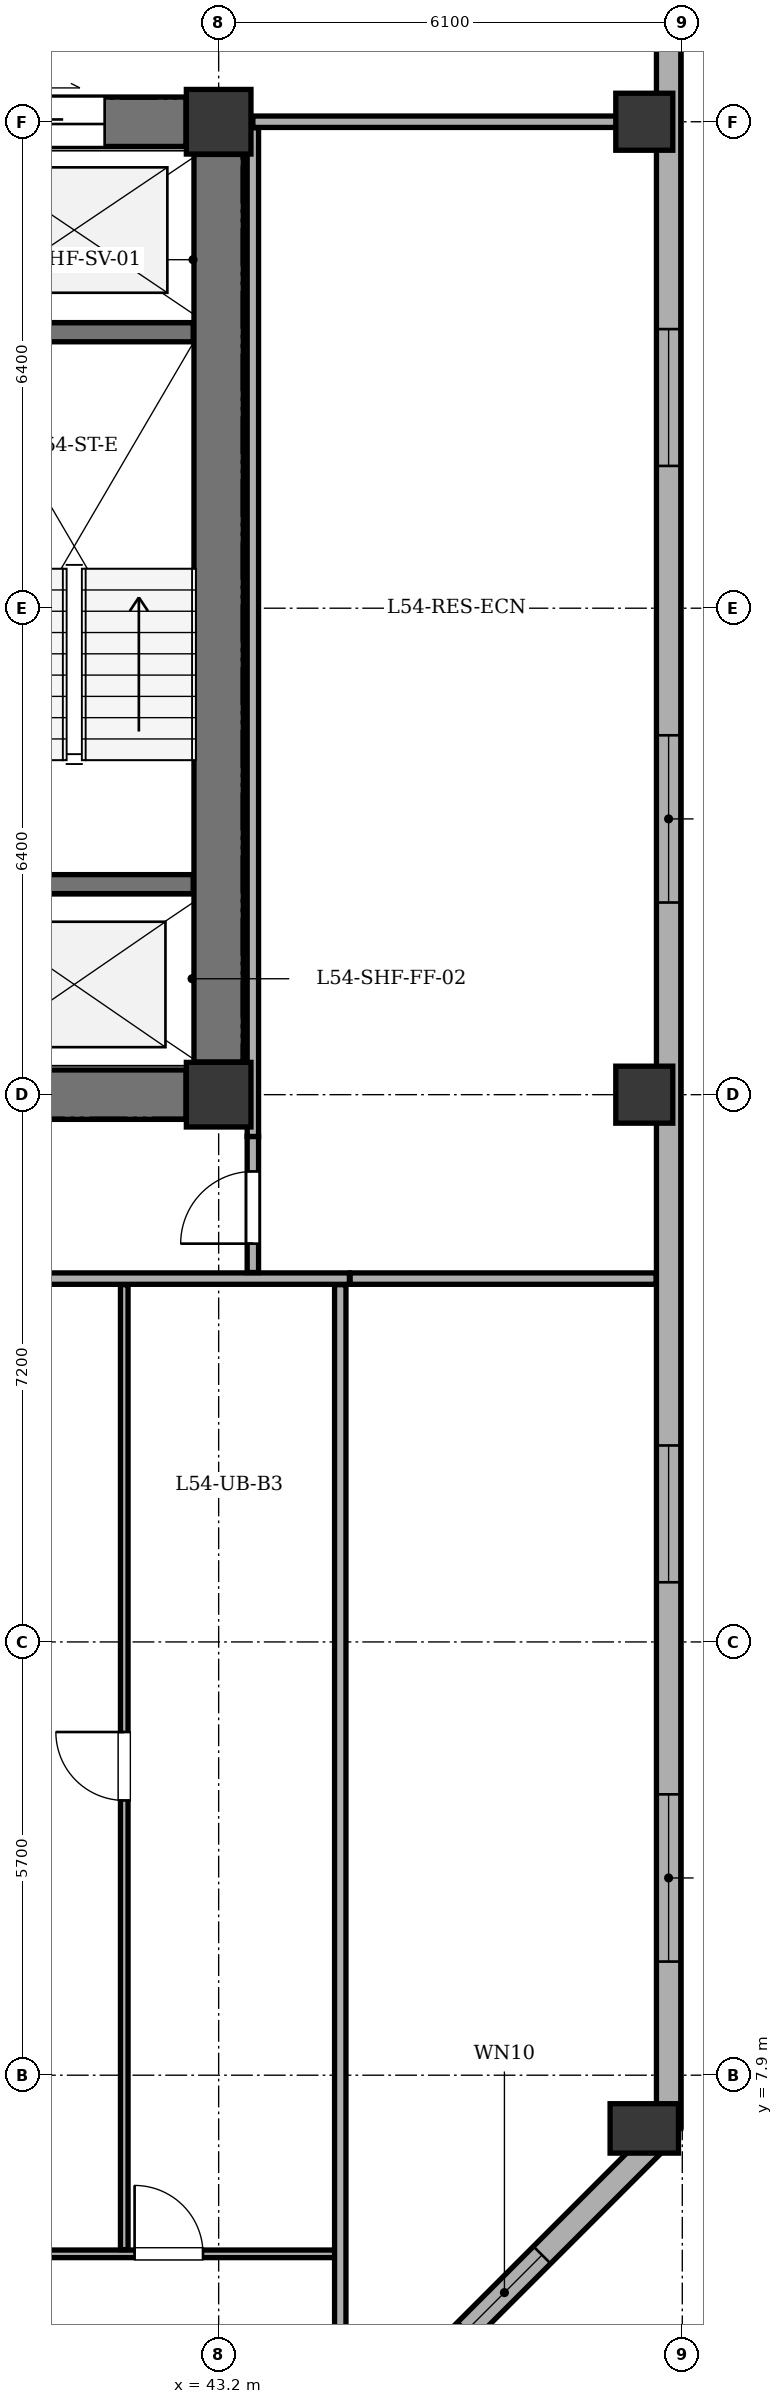
"""IFC4 building model, lengths in metres.
Left out: names, types, materials, properties, quantities, classifications, styles, units other than length and angle.
Written with IfcOpenShell. Run it as: python <this file> out.ifc"""

import sys

from ifc_helpers import new_model, si_unit, direction, frame, frame_2d, origin, origin_2d, place, context, subcontext, project, spatial, rectangle, extrude, element, fill, save


model = new_model("IFC4")
c1 = context("Model", 3, precision=1e-05, world=origin(), true_north=direction((0.0, 1.0)))
c2 = subcontext(c1, "Body", "Model", "MODEL_VIEW")
j1 = project(units=[si_unit("LENGTHUNIT", "METRE"), si_unit("PLANEANGLEUNIT", "RADIAN")], contexts=[c1])
p1 = place(None, origin())
s1 = spatial("IfcSite", under=j1, at=p1, CompositionType="ELEMENT")
p2 = place(p1, origin())
s2 = spatial("IfcBuilding", under=s1, at=p2, CompositionType="ELEMENT")
p3 = place(p2, frame((0.0, 0.0, 210.9)))
s3 = spatial("IfcBuildingStorey", under=s2, at=p3, CompositionType="ELEMENT", Elevation=210.9)
for number, where, z_axis, x_axis in (
    (1, (43.2, 20.8, 0.0), (0.0, 0.0, 1.0), (1.0, 0.0, 0.0)),
    (2, (43.2, 33.6, 0.0), (0.0, 0.0, 1.0), (1.0, 0.0, 0.0)),
):
    element("IfcColumn", number, at=place(p3, frame(where, z_axis=z_axis, x_axis=x_axis)), inside=s3, PredefinedType="COLUMN", context=c2, shape_type="SweptSolid", body=[
        extrude(rectangle(XDim=0.85, YDim=0.85, at=origin_2d()), origin(), (0.0, 0.0, 1.0), 3.4),
    ])
p4 = place(p3, frame((48.8, 7.2, 0.0), z_axis=(0.0, 0.0, 1.0), x_axis=(1.0, 0.0, 0.0)))
e3 = element("IfcColumn", 3, at=p4, inside=s3, PredefinedType="COLUMN", context=c2, shape_type="SweptSolid", body=[
    extrude(rectangle(XDim=0.65, YDim=0.9, at=origin_2d()), origin(), (0.0, 0.0, 1.0), 3.4),
])
for number, where, z_axis, x_axis in (
    (4, (48.8, 20.8, 0.0), (0.0, 0.0, 1.0), (1.0, 0.0, 0.0)),
    (5, (48.8, 33.6, 0.0), (0.0, 0.0, 1.0), (1.0, 0.0, 0.0)),
):
    element("IfcColumn", number, at=place(p3, frame(where, z_axis=z_axis, x_axis=x_axis)), inside=s3, PredefinedType="COLUMN", context=c2, shape_type="SweptSolid", body=[
        extrude(rectangle(XDim=0.75, YDim=0.75, at=origin_2d()), origin(), (0.0, 0.0, 1.0), 3.4),
    ])
p5 = place(p3, frame((49.12, 35.0, 0.0), z_axis=(0.0, 0.0, 1.0), x_axis=(0.0, -1.0, 0.0)))
e6 = element("IfcWall", 6, at=p5, inside=s3, PredefinedType="STANDARD", context=c2, shape_type="SweptSolid", body=[
    extrude(rectangle(XDim=27.8, YDim=0.32, at=frame_2d((13.9, 0.0))), origin(), (0.0, 0.0, 1.0), 2.725),
])
p6 = place(p5, frame((4.128, 0.0, 0.75)))
e7 = element("IfcOpeningElement", 7, at=p6, cuts=e6, PredefinedType="OPENING", context=c2, shape_type="SweptSolid", body=[
    extrude(rectangle(XDim=1.8, YDim=1.7, at=frame_2d((0.9, 0.85))), frame((0.0, 0.17, 0.0), z_axis=(0.0, -1.0, 0.0), x_axis=(1.0, 0.0, 0.0)), (0.0, 0.0, 1.0), 0.34),
])
p7 = place(p5, frame((9.472, 0.0, 0.75)))
e8 = element("IfcOpeningElement", 8, at=p7, cuts=e6, PredefinedType="OPENING", context=c2, shape_type="SweptSolid", body=[
    extrude(rectangle(XDim=2.2, YDim=1.7, at=frame_2d((1.1, 0.85))), frame((0.0, 0.17, 0.0), z_axis=(0.0, -1.0, 0.0), x_axis=(1.0, 0.0, 0.0)), (0.0, 0.0, 1.0), 0.34),
])
p8 = place(p5, frame((18.815, 0.0, 0.75)))
e9 = element("IfcOpeningElement", 9, at=p8, cuts=e6, PredefinedType="OPENING", context=c2, shape_type="SweptSolid", body=[
    extrude(rectangle(XDim=1.8, YDim=1.7, at=frame_2d((0.9, 0.85))), frame((0.0, 0.17, 0.0), z_axis=(0.0, -1.0, 0.0), x_axis=(1.0, 0.0, 0.0)), (0.0, 0.0, 1.0), 0.34),
])
p9 = place(p5, frame((23.405, 0.0, 0.75)))
e10 = element("IfcOpeningElement", 10, at=p9, cuts=e6, PredefinedType="OPENING", context=c2, shape_type="SweptSolid", body=[
    extrude(rectangle(XDim=2.2, YDim=1.7, at=frame_2d((1.1, 0.85))), frame((0.0, 0.17, 0.0), z_axis=(0.0, -1.0, 0.0), x_axis=(1.0, 0.0, 0.0)), (0.0, 0.0, 1.0), 0.34),
])
p10 = place(p3, frame((49.12, 7.2, 0.0), z_axis=(0.0, 0.0, 1.0), x_axis=(-0.707106781187, -0.707106781187, 0.0)))
e11 = element("IfcWall", 11, at=p10, inside=s3, PredefinedType="STANDARD", context=c2, shape_type="SweptSolid", body=[
    extrude(rectangle(XDim=6.11, YDim=0.32, at=frame_2d((3.055, 0.0))), origin(), (0.0, 0.0, 1.0), 2.725),
])
p11 = place(p10, frame((2.355, 0.0, 0.75)))
e12 = element("IfcOpeningElement", 12, at=p11, cuts=e11, PredefinedType="OPENING", context=c2, shape_type="SweptSolid", body=[
    extrude(rectangle(XDim=1.4, YDim=1.65, at=frame_2d((0.7, 0.825))), frame((0.0, 0.17, 0.0), z_axis=(0.0, -1.0, 0.0), x_axis=(1.0, 0.0, 0.0)), (0.0, 0.0, 1.0), 0.34),
])
p12 = place(p3, frame((43.2, 21.23, 0.0), z_axis=(0.0, 0.0, 1.0), x_axis=(0.0, 1.0, 0.0)))
e13 = element("IfcWall", 13, at=p12, inside=s3, PredefinedType="SHEAR", context=c2, shape_type="SweptSolid", body=[
    extrude(rectangle(XDim=11.94, YDim=0.65, at=frame_2d((5.97, 0.0))), origin(), (0.0, 0.0, 1.0), 3.1),
])
p13 = place(p3, frame((35.63, 20.8, 0.0), z_axis=(0.0, 0.0, 1.0), x_axis=(1.0, 0.0, 0.0)))
e14 = element("IfcWall", 14, at=p13, inside=s3, PredefinedType="SHEAR", context=c2, shape_type="SweptSolid", body=[
    extrude(rectangle(XDim=7.14, YDim=0.65, at=frame_2d((3.57, 0.0))), origin(), (0.0, 0.0, 1.0), 3.1),
])
p14 = place(p3, frame((35.63, 33.6, 0.0), z_axis=(0.0, 0.0, 1.0), x_axis=(1.0, 0.0, 0.0)))
e15 = element("IfcWall", 15, at=p14, inside=s3, PredefinedType="SHEAR", context=c2, shape_type="SweptSolid", body=[
    extrude(rectangle(XDim=7.14, YDim=0.65, at=frame_2d((3.57, 0.0))), origin(), (0.0, 0.0, 1.0), 3.1),
])
p15 = place(p14, frame((4.77, 0.0, 0.0)))
e16 = element("IfcOpeningElement", 16, at=p15, cuts=e15, PredefinedType="OPENING", context=c2, shape_type="SweptSolid", body=[
    extrude(rectangle(XDim=1.3, YDim=2.15, at=frame_2d((0.65, 1.075))), frame((0.0, 0.335, 0.0), z_axis=(0.0, -1.0, 0.0), x_axis=(1.0, 0.0, 0.0)), (0.0, 0.0, 1.0), 0.67),
])
p16 = place(p14, frame((2.57, 0.0, 0.0)))
e17 = element("IfcOpeningElement", 17, at=p16, cuts=e15, PredefinedType="OPENING", context=c2, shape_type="SweptSolid", body=[
    extrude(rectangle(XDim=0.85, YDim=2.02, at=frame_2d((0.425, 1.01))), frame((0.0, 0.335, 0.0), z_axis=(0.0, -1.0, 0.0), x_axis=(1.0, 0.0, 0.0)), (0.0, 0.0, 1.0), 0.67),
])
for number, where, z_axis, x_axis in (
    (18, (39.69, 23.57, 0.0), (0.0, 0.0, 1.0), (1.0, 0.0, 0.0)),
    (19, (39.69, 30.83, 0.0), (0.0, 0.0, 1.0), (1.0, 0.0, 0.0)),
):
    element("IfcWall", number, at=place(p3, frame(where, z_axis=z_axis, x_axis=x_axis)), inside=s3, PredefinedType="SHEAR", context=c2, shape_type="SweptSolid", body=[
        extrude(rectangle(XDim=3.175, YDim=0.25, at=frame_2d((1.587, 0.0))), origin(), (0.0, 0.0, 1.0), 3.1),
    ])
p17 = place(p3, frame((10.9, 18.38, 0.0), z_axis=(0.0, 0.0, 1.0), x_axis=(1.0, 0.0, 0.0)))
e20 = element("IfcWall", 20, at=p17, inside=s3, PredefinedType="PARTITIONING", context=c2, shape_type="SweptSolid", body=[
    extrude(rectangle(XDim=34.02, YDim=0.15, at=frame_2d((17.01, 0.0))), origin(), (0.0, 0.0, 1.0), 3.1),
])
p18 = place(p17, frame((7.727, 0.0, 0.0)))
e21 = element("IfcOpeningElement", 21, at=p18, cuts=e20, PredefinedType="OPENING", context=c2, shape_type="SweptSolid", body=[
    extrude(rectangle(XDim=1.0, YDim=2.1, at=frame_2d((0.5, 1.05))), frame((0.0, 0.085, 0.0), z_axis=(0.0, -1.0, 0.0), x_axis=(1.0, 0.0, 0.0)), (0.0, 0.0, 1.0), 0.17),
])
p19 = place(p17, frame((24.617, 0.0, 0.0)))
e22 = element("IfcOpeningElement", 22, at=p19, cuts=e20, PredefinedType="OPENING", context=c2, shape_type="SweptSolid", body=[
    extrude(rectangle(XDim=1.0, YDim=2.1, at=frame_2d((0.5, 1.05))), frame((0.0, 0.085, 0.0), z_axis=(0.0, -1.0, 0.0), x_axis=(1.0, 0.0, 0.0)), (0.0, 0.0, 1.0), 0.17),
])
p20 = place(p3, frame((27.314, 5.55, 0.0), z_axis=(0.0, 0.0, 1.0), x_axis=(1.0, 0.0, 0.0)))
e23 = element("IfcWall", 23, at=p20, inside=s3, PredefinedType="PARTITIONING", context=c2, shape_type="SweptSolid", body=[
    extrude(rectangle(XDim=17.526, YDim=0.1, at=frame_2d((8.763, 0.0))), origin(), (0.0, 0.0, 1.0), 3.1),
])
p21 = place(p20, frame((0.65, 0.0, 0.0)))
e24 = element("IfcOpeningElement", 24, at=p21, cuts=e23, PredefinedType="OPENING", context=c2, shape_type="SweptSolid", body=[
    extrude(rectangle(XDim=0.85, YDim=2.05, at=frame_2d((0.425, 1.025))), frame((0.0, 0.06, 0.0), z_axis=(0.0, -1.0, 0.0), x_axis=(1.0, 0.0, 0.0)), (0.0, 0.0, 1.0), 0.12),
])
p22 = place(p20, frame((5.001, 0.0, 0.0)))
e25 = element("IfcOpeningElement", 25, at=p22, cuts=e23, PredefinedType="OPENING", context=c2, shape_type="SweptSolid", body=[
    extrude(rectangle(XDim=0.85, YDim=2.05, at=frame_2d((0.425, 1.025))), frame((0.0, 0.06, 0.0), z_axis=(0.0, -1.0, 0.0), x_axis=(1.0, 0.0, 0.0)), (0.0, 0.0, 1.0), 0.12),
])
p23 = place(p20, frame((10.428, 0.0, 0.0)))
e26 = element("IfcOpeningElement", 26, at=p23, cuts=e23, PredefinedType="OPENING", context=c2, shape_type="SweptSolid", body=[
    extrude(rectangle(XDim=0.9, YDim=2.05, at=frame_2d((0.45, 1.025))), frame((0.0, 0.06, 0.0), z_axis=(0.0, -1.0, 0.0), x_axis=(1.0, 0.0, 0.0)), (0.0, 0.0, 1.0), 0.12),
])
p24 = place(p20, frame((14.78, 0.0, 0.0)))
e27 = element("IfcOpeningElement", 27, at=p24, cuts=e23, PredefinedType="OPENING", context=c2, shape_type="SweptSolid", body=[
    extrude(rectangle(XDim=0.9, YDim=2.05, at=frame_2d((0.45, 1.025))), frame((0.0, 0.06, 0.0), z_axis=(0.0, -1.0, 0.0), x_axis=(1.0, 0.0, 0.0)), (0.0, 0.0, 1.0), 0.12),
])
p25 = place(p3, frame((41.958, 5.605, 0.0), z_axis=(0.0, 0.0, 1.0), x_axis=(0.0, 1.0, 0.0)))
e28 = element("IfcWall", 28, at=p25, inside=s3, PredefinedType="PARTITIONING", context=c2, shape_type="SweptSolid", body=[
    extrude(rectangle(XDim=12.695, YDim=0.1, at=frame_2d((6.348, 0.0))), origin(), (0.0, 0.0, 1.0), 2.725),
])
p26 = place(p25, frame((5.91, 0.0, 0.0)))
e29 = element("IfcOpeningElement", 29, at=p26, cuts=e28, PredefinedType="OPENING", context=c2, shape_type="SweptSolid", body=[
    extrude(rectangle(XDim=0.9, YDim=2.05, at=frame_2d((0.45, 1.025))), frame((0.0, 0.06, 0.0), z_axis=(0.0, -1.0, 0.0), x_axis=(1.0, 0.0, 0.0)), (0.0, 0.0, 1.0), 0.12),
])
p27 = place(p3, frame((44.8, 3.045, 0.0), z_axis=(0.0, 0.0, 1.0), x_axis=(0.0, 1.0, 0.0)))
e30 = element("IfcWall", 30, at=p27, inside=s3, PredefinedType="PARTITIONING", context=c2, shape_type="SweptSolid", body=[
    extrude(rectangle(XDim=15.255, YDim=0.15, at=frame_2d((7.627, 0.0))), origin(), (0.0, 0.0, 1.0), 3.1),
])
p28 = place(p3, frame((44.93, 18.38, 0.0), z_axis=(0.0, 0.0, 1.0), x_axis=(1.0, 0.0, 0.0)))
e31 = element("IfcWall", 31, at=p28, inside=s3, PredefinedType="PARTITIONING", context=c2, shape_type="SweptSolid", body=[
    extrude(rectangle(XDim=4.025, YDim=0.15, at=frame_2d((2.013, 0.0))), origin(), (0.0, 0.0, 1.0), 3.1),
])
p29 = place(p3, frame((43.65, 33.6, 0.0), z_axis=(0.0, 0.0, 1.0), x_axis=(1.0, 0.0, 0.0)))
e32 = element("IfcWall", 32, at=p29, inside=s3, PredefinedType="PARTITIONING", context=c2, shape_type="SweptSolid", body=[
    extrude(rectangle(XDim=5.305, YDim=0.15, at=frame_2d((2.653, 0.0))), origin(), (0.0, 0.0, 1.0), 2.535),
])
p30 = place(p3, frame((43.65, 18.46, 0.0), z_axis=(0.0, 0.0, 1.0), x_axis=(0.0, 1.0, 0.0)))
e33 = element("IfcWall", 33, at=p30, inside=s3, PredefinedType="PARTITIONING", context=c2, shape_type="SweptSolid", body=[
    extrude(rectangle(XDim=1.79, YDim=0.15, at=frame_2d((0.895, 0.0))), origin(), (0.0, 0.0, 1.0), 3.1),
])
p31 = place(p30, frame((0.38, 0.0, 0.0)))
e34 = element("IfcOpeningElement", 34, at=p31, cuts=e33, PredefinedType="OPENING", context=c2, shape_type="SweptSolid", body=[
    extrude(rectangle(XDim=0.95, YDim=2.1, at=frame_2d((0.475, 1.05))), frame((0.0, 0.085, 0.0), z_axis=(0.0, -1.0, 0.0), x_axis=(1.0, 0.0, 0.0)), (0.0, 0.0, 1.0), 0.17),
])
p32 = place(p3, frame((43.65, 20.25, 0.0), z_axis=(0.0, 0.0, 1.0), x_axis=(0.0, 1.0, 0.0)))
e35 = element("IfcWall", 35, at=p32, inside=s3, PredefinedType="PARTITIONING", context=c2, shape_type="SweptSolid", body=[
    extrude(rectangle(XDim=13.27, YDim=0.15, at=frame_2d((6.635, 0.0))), origin(), (0.0, 0.0, 1.0), 3.1),
])
p33 = place(p6, origin())
e36 = element("IfcWindow", 36, at=p33, inside=s3, PartitioningType="SINGLE_PANEL", PredefinedType="WINDOW", context=c2, shape_type="SweptSolid", body=[
    extrude(rectangle(XDim=1.8, YDim=1.7, at=frame_2d((0.9, 0.85))), frame((0.0, -0.01, 0.0), z_axis=(0.0, -1.0, 0.0), x_axis=(1.0, 0.0, 0.0)), (0.0, 0.0, 1.0), 0.06),
])
fill(e7, e36)
p34 = place(p7, origin())
e37 = element("IfcWindow", 37, at=p34, inside=s3, PartitioningType="SINGLE_PANEL", PredefinedType="WINDOW", context=c2, shape_type="SweptSolid", body=[
    extrude(rectangle(XDim=2.2, YDim=1.7, at=frame_2d((1.1, 0.85))), frame((0.0, -0.01, 0.0), z_axis=(0.0, -1.0, 0.0), x_axis=(1.0, 0.0, 0.0)), (0.0, 0.0, 1.0), 0.06),
])
fill(e8, e37)
p35 = place(p8, origin())
e38 = element("IfcWindow", 38, at=p35, inside=s3, PartitioningType="SINGLE_PANEL", PredefinedType="WINDOW", context=c2, shape_type="SweptSolid", body=[
    extrude(rectangle(XDim=1.8, YDim=1.7, at=frame_2d((0.9, 0.85))), frame((0.0, -0.01, 0.0), z_axis=(0.0, -1.0, 0.0), x_axis=(1.0, 0.0, 0.0)), (0.0, 0.0, 1.0), 0.06),
])
fill(e9, e38)
p36 = place(p9, origin())
e39 = element("IfcWindow", 39, at=p36, inside=s3, PartitioningType="SINGLE_PANEL", PredefinedType="WINDOW", context=c2, shape_type="SweptSolid", body=[
    extrude(rectangle(XDim=2.2, YDim=1.7, at=frame_2d((1.1, 0.85))), frame((0.0, -0.01, 0.0), z_axis=(0.0, -1.0, 0.0), x_axis=(1.0, 0.0, 0.0)), (0.0, 0.0, 1.0), 0.06),
])
fill(e10, e39)
p37 = place(p11, origin())
e40 = element("IfcWindow", 40, at=p37, inside=s3, PartitioningType="SINGLE_PANEL", PredefinedType="WINDOW", context=c2, shape_type="SweptSolid", body=[
    extrude(rectangle(XDim=1.4, YDim=1.65, at=frame_2d((0.7, 0.825))), frame((0.0, -0.01, 0.0), z_axis=(0.0, -1.0, 0.0), x_axis=(1.0, 0.0, 0.0)), (0.0, 0.0, 1.0), 0.06),
])
fill(e12, e40)
p38 = place(p15, origin())
e41 = element("IfcDoor", 41, at=p38, inside=s3, OperationType="DOUBLE_DOOR_SLIDING", PredefinedType="DOOR", context=c2, shape_type="SweptSolid", body=[
    extrude(rectangle(XDim=1.3, YDim=2.15, at=frame_2d((0.65, 1.075))), frame((0.0, 0.025, 0.0), z_axis=(0.0, -1.0, 0.0), x_axis=(1.0, 0.0, 0.0)), (0.0, 0.0, 1.0), 0.05),
])
fill(e16, e41)
p39 = place(p26, origin())
e42 = element("IfcDoor", 42, at=p39, inside=s3, OperationType="SINGLE_SWING_RIGHT", PredefinedType="DOOR", context=c2, shape_type="SweptSolid", body=[
    extrude(rectangle(XDim=0.9, YDim=2.05, at=frame_2d((0.45, 1.025))), frame((0.0, 0.025, 0.0), z_axis=(0.0, -1.0, 0.0), x_axis=(1.0, 0.0, 0.0)), (0.0, 0.0, 1.0), 0.05),
])
fill(e29, e42)
p40 = place(p24, origin())
e43 = element("IfcDoor", 43, at=p40, inside=s3, OperationType="SINGLE_SWING_LEFT", PredefinedType="DOOR", context=c2, shape_type="SweptSolid", body=[
    extrude(rectangle(XDim=0.9, YDim=2.05, at=frame_2d((0.45, 1.025))), frame((0.0, 0.025, 0.0), z_axis=(0.0, -1.0, 0.0), x_axis=(1.0, 0.0, 0.0)), (0.0, 0.0, 1.0), 0.05),
])
fill(e27, e43)
p41 = place(p31, origin())
e44 = element("IfcDoor", 44, at=p41, inside=s3, OperationType="SINGLE_SWING_LEFT", PredefinedType="DOOR", context=c2, shape_type="SweptSolid", body=[
    extrude(rectangle(XDim=0.95, YDim=2.1, at=frame_2d((0.475, 1.05))), frame((0.0, 0.025, 0.0), z_axis=(0.0, -1.0, 0.0), x_axis=(1.0, 0.0, 0.0)), (0.0, 0.0, 1.0), 0.05),
])
fill(e34, e44)
save(model, sys.argv[1])
